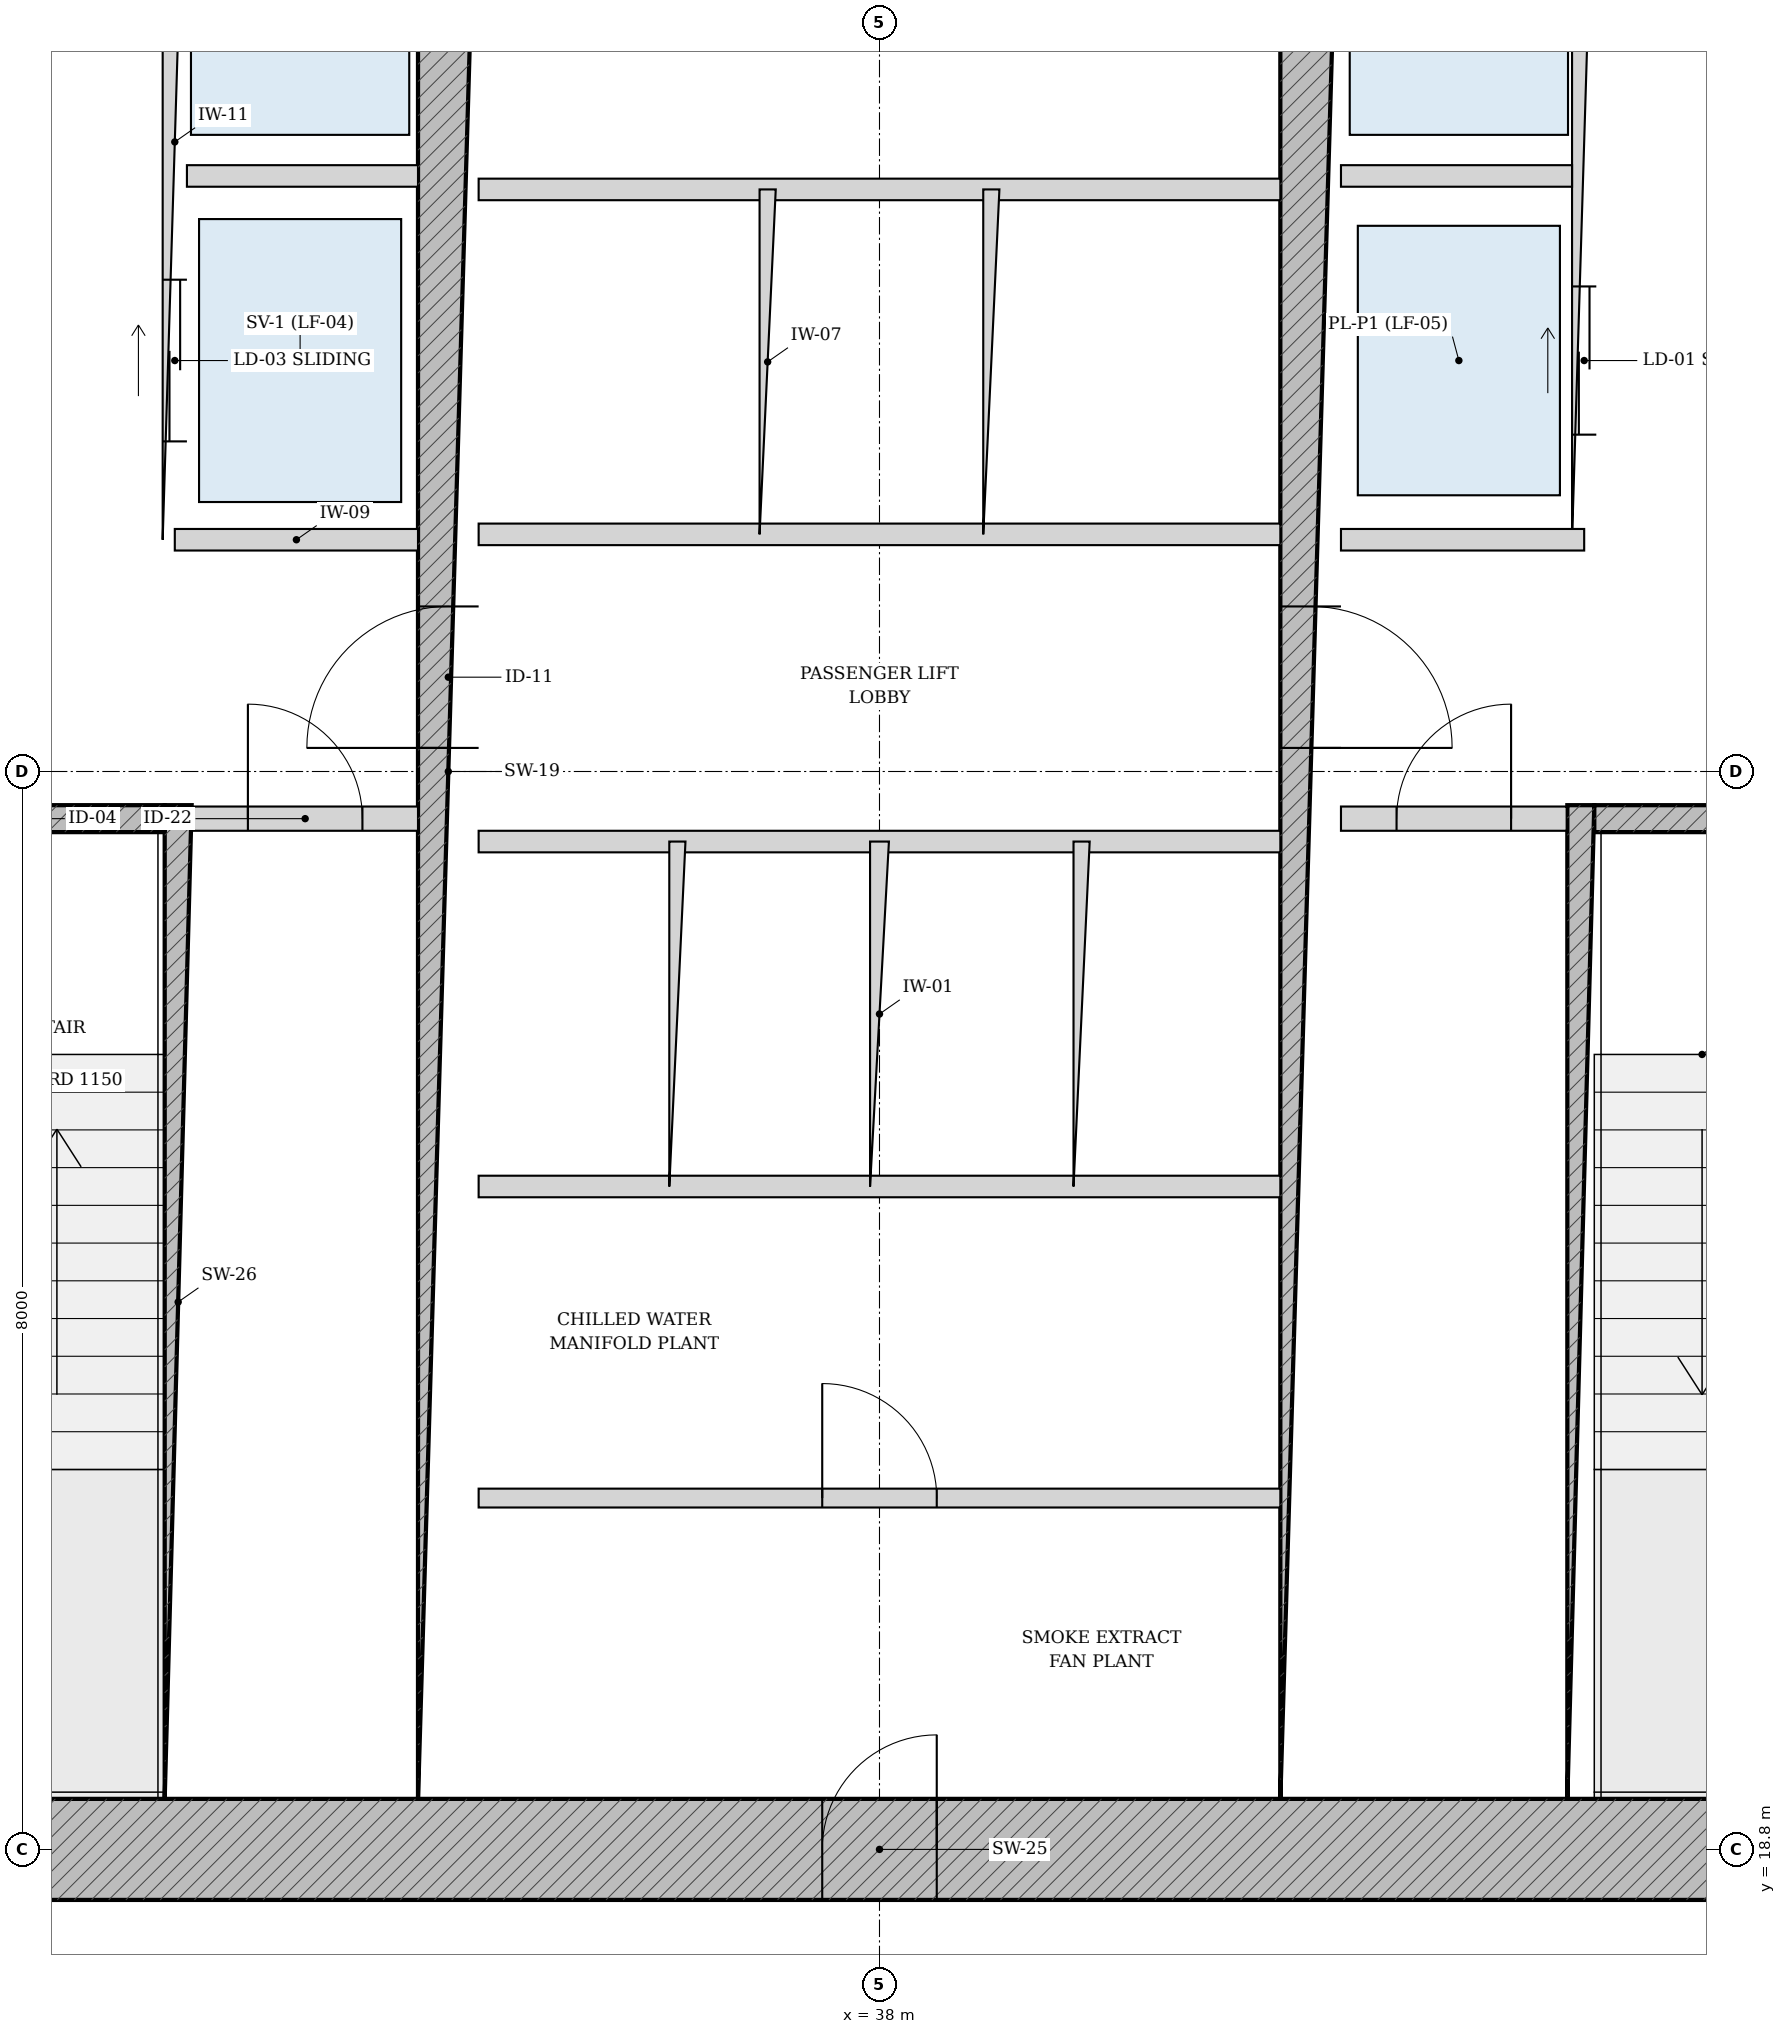
"""IFC4 building model, lengths in metres.
Left out: names, types, materials, properties, quantities, classifications, styles, units other than length and angle.
Written with IfcOpenShell. Run it as: python <this file> out.ifc"""

import sys

from ifc_helpers import new_model, si_unit, direction, frame, frame_2d, origin, place, context, subcontext, project, spatial, rectangle, extrude, source, transform, mapped, element, fill, save


model = new_model("IFC4")
c1 = context("Model", 3, precision=1e-05, world=origin(), true_north=direction((-0.2419218956, 0.970295726276)))
c2 = subcontext(c1, "Body", "Model", "MODEL_VIEW")
j1 = project(units=[si_unit("LENGTHUNIT", "METRE"), si_unit("PLANEANGLEUNIT", "RADIAN")], contexts=[c1])
p1 = place(None, origin())
s1 = spatial("IfcSite", under=j1, at=p1, CompositionType="ELEMENT")
p2 = place(p1, origin())
s2 = spatial("IfcBuilding", under=s1, at=p2, CompositionType="ELEMENT")
p3 = place(p2, frame((0.0, 0.0, -8.4)))
s3 = spatial("IfcBuildingStorey", under=s2, at=p3, CompositionType="ELEMENT", Elevation=-8.4)
p4 = place(p3, frame((28.625, 18.8, 0.0), z_axis=(0.0, 0.0, 1.0), x_axis=(1.0, 0.0, 0.0)))
e1 = element("IfcWall", 1, at=p4, inside=s3, PredefinedType="SHEAR", context=c2, shape_type="SweptSolid", body=[
    extrude(rectangle(XDim=18.75, YDim=0.75, at=frame_2d((9.375, 0.0))), origin(), (0.0, 0.0, 1.0), 3.88),
])
p5 = place(p4, frame((8.95, 0.0, 0.0)))
e2 = element("IfcOpeningElement", 2, at=p5, cuts=e1, PredefinedType="OPENING", context=c2, shape_type="SweptSolid", body=[
    extrude(rectangle(XDim=0.85, YDim=2.1, at=frame_2d((0.425, 1.05))), frame((0.0, 0.385, 0.0), z_axis=(0.0, -1.0, 0.0), x_axis=(1.0, 0.0, 0.0)), (0.0, 0.0, 1.0), 0.77),
])
p6 = place(p3, frame((32.795, 19.175, 0.0), z_axis=(0.0, 0.0, 1.0), x_axis=(0.0, 1.0, 0.0)))
e3 = element("IfcWall", 3, at=p6, inside=s3, PredefinedType="SOLIDWALL", context=c2, shape_type="SweptSolid", body=[
    extrude(rectangle(XDim=7.375, YDim=0.2, at=frame_2d((3.688, 0.0))), origin(), (0.0, 0.0, 1.0), 3.88),
])
p7 = place(p3, frame((29.375, 26.45, 0.0), z_axis=(0.0, 0.0, 1.0), x_axis=(1.0, 0.0, 0.0)))
e4 = element("IfcWall", 4, at=p7, inside=s3, PredefinedType="SOLIDWALL", context=c2, shape_type="SweptSolid", body=[
    extrude(rectangle(XDim=3.32, YDim=0.2, at=frame_2d((1.66, 0.0))), origin(), (0.0, 0.0, 1.0), 3.88),
])
p8 = place(p7, frame((1.185, 0.0, 0.0)))
e5 = element("IfcOpeningElement", 5, at=p8, cuts=e4, PredefinedType="OPENING", context=c2, shape_type="SweptSolid", body=[
    extrude(rectangle(XDim=0.95, YDim=2.15, at=frame_2d((0.475, 1.075))), frame((0.0, 0.11, 0.0), z_axis=(0.0, -1.0, 0.0), x_axis=(1.0, 0.0, 0.0)), (0.0, 0.0, 1.0), 0.22),
])
p9 = place(p3, frame((43.205, 19.175, 0.0), z_axis=(0.0, 0.0, 1.0), x_axis=(0.0, 1.0, 0.0)))
e6 = element("IfcWall", 6, at=p9, inside=s3, PredefinedType="SOLIDWALL", context=c2, shape_type="SweptSolid", body=[
    extrude(rectangle(XDim=7.375, YDim=0.2, at=frame_2d((3.688, 0.0))), origin(), (0.0, 0.0, 1.0), 3.88),
])
p10 = place(p3, frame((43.305, 26.45, 0.0), z_axis=(0.0, 0.0, 1.0), x_axis=(1.0, 0.0, 0.0)))
e7 = element("IfcWall", 7, at=p10, inside=s3, PredefinedType="SOLIDWALL", context=c2, shape_type="SweptSolid", body=[
    extrude(rectangle(XDim=3.32, YDim=0.2, at=frame_2d((1.66, 0.0))), origin(), (0.0, 0.0, 1.0), 3.88),
])
p11 = place(p10, frame((1.185, 0.0, 0.0)))
e8 = element("IfcOpeningElement", 8, at=p11, cuts=e7, PredefinedType="OPENING", context=c2, shape_type="SweptSolid", body=[
    extrude(rectangle(XDim=0.95, YDim=2.15, at=frame_2d((0.475, 1.075))), frame((0.0, 0.11, 0.0), z_axis=(0.0, -1.0, 0.0), x_axis=(1.0, 0.0, 0.0)), (0.0, 0.0, 1.0), 0.22),
])
p12 = place(p3, frame((34.8, 19.175, 0.0), z_axis=(0.0, 0.0, 1.0), x_axis=(0.0, 1.0, 0.0)))
e9 = element("IfcWall", 9, at=p12, inside=s3, PredefinedType="SHEAR", context=c2, shape_type="SweptSolid", body=[
    extrude(rectangle(XDim=15.25, YDim=0.45, at=frame_2d((7.625, 0.0))), origin(), (0.0, 0.0, 1.0), 3.88),
])
p13 = place(p12, frame((7.8, 0.0, 0.0)))
e10 = element("IfcOpeningElement", 10, at=p13, cuts=e9, PredefinedType="OPENING", context=c2, shape_type="SweptSolid", body=[
    extrude(rectangle(XDim=1.05, YDim=2.15, at=frame_2d((0.525, 1.075))), frame((0.0, 0.235, 0.0), z_axis=(0.0, -1.0, 0.0), x_axis=(1.0, 0.0, 0.0)), (0.0, 0.0, 1.0), 0.47),
])
p14 = place(p3, frame((41.2, 19.175, 0.0), z_axis=(0.0, 0.0, 1.0), x_axis=(0.0, 1.0, 0.0)))
e11 = element("IfcWall", 11, at=p14, inside=s3, PredefinedType="SHEAR", context=c2, shape_type="SweptSolid", body=[
    extrude(rectangle(XDim=15.25, YDim=0.45, at=frame_2d((7.625, 0.0))), origin(), (0.0, 0.0, 1.0), 3.88),
])
p15 = place(p14, frame((7.8, 0.0, 0.0)))
e12 = element("IfcOpeningElement", 12, at=p15, cuts=e11, PredefinedType="OPENING", context=c2, shape_type="SweptSolid", body=[
    extrude(rectangle(XDim=1.05, YDim=2.15, at=frame_2d((0.525, 1.075))), frame((0.0, 0.235, 0.0), z_axis=(0.0, -1.0, 0.0), x_axis=(1.0, 0.0, 0.0)), (0.0, 0.0, 1.0), 0.47),
])
p16 = place(p3, frame((32.9, 26.45, 0.0), z_axis=(0.0, 0.0, 1.0), x_axis=(1.0, 0.0, 0.0)))
e13 = element("IfcWall", 13, at=p16, inside=s3, PredefinedType="PARTITIONING", context=c2, shape_type="SweptSolid", body=[
    extrude(rectangle(XDim=1.675, YDim=0.18, at=frame_2d((0.837, 0.0))), origin(), (0.0, 0.0, 1.0), 3.88),
])
p17 = place(p16, frame((0.413, 0.0, 0.0)))
e14 = element("IfcOpeningElement", 14, at=p17, cuts=e13, PredefinedType="OPENING", context=c2, shape_type="SweptSolid", body=[
    extrude(rectangle(XDim=0.85, YDim=2.1, at=frame_2d((0.425, 1.05))), frame((0.0, 0.1, 0.0), z_axis=(0.0, -1.0, 0.0), x_axis=(1.0, 0.0, 0.0)), (0.0, 0.0, 1.0), 0.2),
])
p18 = place(p3, frame((41.425, 26.45, 0.0), z_axis=(0.0, 0.0, 1.0), x_axis=(1.0, 0.0, 0.0)))
e15 = element("IfcWall", 15, at=p18, inside=s3, PredefinedType="PARTITIONING", context=c2, shape_type="SweptSolid", body=[
    extrude(rectangle(XDim=1.675, YDim=0.18, at=frame_2d((0.837, 0.0))), origin(), (0.0, 0.0, 1.0), 3.88),
])
p19 = place(p18, frame((0.413, 0.0, 0.0)))
e16 = element("IfcOpeningElement", 16, at=p19, cuts=e15, PredefinedType="OPENING", context=c2, shape_type="SweptSolid", body=[
    extrude(rectangle(XDim=0.85, YDim=2.1, at=frame_2d((0.425, 1.05))), frame((0.0, 0.1, 0.0), z_axis=(0.0, -1.0, 0.0), x_axis=(1.0, 0.0, 0.0)), (0.0, 0.0, 1.0), 0.2),
])
p20 = place(p3, frame((32.77, 28.52, 0.0), z_axis=(0.0, 0.0, 1.0), x_axis=(0.0, 1.0, 0.0)))
e17 = element("IfcWall", 17, at=p20, inside=s3, PredefinedType="PARTITIONING", context=c2, shape_type="SweptSolid", body=[
    extrude(rectangle(XDim=5.905, YDim=0.18, at=frame_2d((2.953, 0.0))), origin(), (0.0, 0.0, 1.0), 3.88),
])
p21 = place(p20, frame((3.655, 0.0, 0.0)))
e18 = element("IfcOpeningElement", 18, at=p21, cuts=e17, PredefinedType="OPENING", context=c2, shape_type="SweptSolid", body=[
    extrude(rectangle(XDim=1.15, YDim=2.2, at=frame_2d((0.575, 1.1))), frame((0.0, 0.1, 0.0), z_axis=(0.0, -1.0, 0.0), x_axis=(1.0, 0.0, 0.0)), (0.0, 0.0, 1.0), 0.2),
])
p22 = place(p20, frame((0.73, 0.0, 0.0)))
e19 = element("IfcOpeningElement", 19, at=p22, cuts=e17, PredefinedType="OPENING", context=c2, shape_type="SweptSolid", body=[
    extrude(rectangle(XDim=1.2, YDim=2.25, at=frame_2d((0.6, 1.125))), frame((0.0, 0.1, 0.0), z_axis=(0.0, -1.0, 0.0), x_axis=(1.0, 0.0, 0.0)), (0.0, 0.0, 1.0), 0.2),
])
p23 = place(p3, frame((32.86, 31.22, 0.0), z_axis=(0.0, 0.0, 1.0), x_axis=(1.0, 0.0, 0.0)))
e20 = element("IfcWall", 20, at=p23, inside=s3, PredefinedType="PARTITIONING", context=c2, shape_type="SweptSolid", body=[
    extrude(rectangle(XDim=1.715, YDim=0.16, at=frame_2d((0.857, 0.0))), origin(), (0.0, 0.0, 1.0), 3.88),
])
p24 = place(p3, frame((32.77, 28.52, 0.0), z_axis=(0.0, 0.0, 1.0), x_axis=(1.0, 0.0, 0.0)))
e21 = element("IfcWall", 21, at=p24, inside=s3, PredefinedType="PARTITIONING", context=c2, shape_type="SweptSolid", body=[
    extrude(rectangle(XDim=1.805, YDim=0.16, at=frame_2d((0.902, 0.0))), origin(), (0.0, 0.0, 1.0), 3.88),
])
p25 = place(p3, frame((43.23, 28.52, 0.0), z_axis=(0.0, 0.0, 1.0), x_axis=(0.0, 1.0, 0.0)))
e22 = element("IfcWall", 22, at=p25, inside=s3, PredefinedType="PARTITIONING", context=c2, shape_type="SweptSolid", body=[
    extrude(rectangle(XDim=5.905, YDim=0.18, at=frame_2d((2.953, 0.0))), origin(), (0.0, 0.0, 1.0), 3.88),
])
p26 = place(p25, frame((3.655, 0.0, 0.0)))
e23 = element("IfcOpeningElement", 23, at=p26, cuts=e22, PredefinedType="OPENING", context=c2, shape_type="SweptSolid", body=[
    extrude(rectangle(XDim=1.15, YDim=2.2, at=frame_2d((0.575, 1.1))), frame((0.0, 0.1, 0.0), z_axis=(0.0, -1.0, 0.0), x_axis=(1.0, 0.0, 0.0)), (0.0, 0.0, 1.0), 0.2),
])
p27 = place(p25, frame((0.78, 0.0, 0.0)))
e24 = element("IfcOpeningElement", 24, at=p27, cuts=e22, PredefinedType="OPENING", context=c2, shape_type="SweptSolid", body=[
    extrude(rectangle(XDim=1.1, YDim=2.2, at=frame_2d((0.55, 1.1))), frame((0.0, 0.1, 0.0), z_axis=(0.0, -1.0, 0.0), x_axis=(1.0, 0.0, 0.0)), (0.0, 0.0, 1.0), 0.2),
])
p28 = place(p3, frame((41.425, 31.22, 0.0), z_axis=(0.0, 0.0, 1.0), x_axis=(1.0, 0.0, 0.0)))
e25 = element("IfcWall", 25, at=p28, inside=s3, PredefinedType="PARTITIONING", context=c2, shape_type="SweptSolid", body=[
    extrude(rectangle(XDim=1.715, YDim=0.16, at=frame_2d((0.857, 0.0))), origin(), (0.0, 0.0, 1.0), 3.88),
])
p29 = place(p3, frame((41.425, 28.52, 0.0), z_axis=(0.0, 0.0, 1.0), x_axis=(1.0, 0.0, 0.0)))
e26 = element("IfcWall", 26, at=p29, inside=s3, PredefinedType="PARTITIONING", context=c2, shape_type="SweptSolid", body=[
    extrude(rectangle(XDim=1.805, YDim=0.16, at=frame_2d((0.902, 0.0))), origin(), (0.0, 0.0, 1.0), 3.88),
])
for number, where, z_axis, x_axis in (
    (27, (35.025, 28.56, 0.0), (0.0, 0.0, 1.0), (1.0, 0.0, 0.0)),
    (28, (35.025, 31.12, 0.0), (0.0, 0.0, 1.0), (1.0, 0.0, 0.0)),
):
    element("IfcWall", number, at=place(p3, frame(where, z_axis=z_axis, x_axis=x_axis)), inside=s3, PredefinedType="PARTITIONING", context=c2, shape_type="SweptSolid", body=[
        extrude(rectangle(XDim=5.95, YDim=0.16, at=frame_2d((2.975, 0.0))), origin(), (0.0, 0.0, 1.0), 3.88),
    ])
for number, where, z_axis, x_axis in (
    (29, (37.17, 28.56, 0.0), (0.0, 0.0, 1.0), (0.0, 1.0, 0.0)),
    (30, (38.83, 28.56, 0.0), (0.0, 0.0, 1.0), (0.0, 1.0, 0.0)),
):
    element("IfcWall", number, at=place(p3, frame(where, z_axis=z_axis, x_axis=x_axis)), inside=s3, PredefinedType="PARTITIONING", context=c2, shape_type="SweptSolid", body=[
        extrude(rectangle(XDim=2.56, YDim=0.12, at=frame_2d((1.28, 0.0))), origin(), (0.0, 0.0, 1.0), 3.88),
    ])
for number, where, z_axis, x_axis in (
    (31, (35.025, 26.28, 0.0), (0.0, 0.0, 1.0), (1.0, 0.0, 0.0)),
    (32, (35.025, 23.72, 0.0), (0.0, 0.0, 1.0), (1.0, 0.0, 0.0)),
):
    element("IfcWall", number, at=place(p3, frame(where, z_axis=z_axis, x_axis=x_axis)), inside=s3, PredefinedType="PARTITIONING", context=c2, shape_type="SweptSolid", body=[
        extrude(rectangle(XDim=5.95, YDim=0.16, at=frame_2d((2.975, 0.0))), origin(), (0.0, 0.0, 1.0), 3.88),
    ])
p30 = place(p3, frame((36.5, 23.72, 0.0), z_axis=(0.0, 0.0, 1.0), x_axis=(0.0, 1.0, 0.0)))
e33 = element("IfcWall", 33, at=p30, inside=s3, PredefinedType="PARTITIONING", context=c2, shape_type="SweptSolid", body=[
    extrude(rectangle(XDim=2.56, YDim=0.12, at=frame_2d((1.28, 0.0))), origin(), (0.0, 0.0, 1.0), 3.88),
])
p31 = place(p3, frame((38.0, 23.72, 0.0), z_axis=(0.0, 0.0, 1.0), x_axis=(0.0, 1.0, 0.0)))
e34 = element("IfcWall", 34, at=p31, inside=s3, PredefinedType="PARTITIONING", context=c2, shape_type="SweptSolid", body=[
    extrude(rectangle(XDim=2.56, YDim=0.14, at=frame_2d((1.28, 0.0))), origin(), (0.0, 0.0, 1.0), 3.88),
])
p32 = place(p3, frame((39.5, 23.72, 0.0), z_axis=(0.0, 0.0, 1.0), x_axis=(0.0, 1.0, 0.0)))
e35 = element("IfcWall", 35, at=p32, inside=s3, PredefinedType="PARTITIONING", context=c2, shape_type="SweptSolid", body=[
    extrude(rectangle(XDim=2.56, YDim=0.12, at=frame_2d((1.28, 0.0))), origin(), (0.0, 0.0, 1.0), 3.88),
])
p33 = place(p3, frame((35.025, 21.407, 0.0), z_axis=(0.0, 0.0, 1.0), x_axis=(1.0, 0.0, 0.0)))
e36 = element("IfcWall", 36, at=p33, inside=s3, PredefinedType="PARTITIONING", context=c2, shape_type="SweptSolid", body=[
    extrude(rectangle(XDim=5.95, YDim=0.14, at=frame_2d((2.975, 0.0))), origin(), (0.0, 0.0, 1.0), 3.88),
])
p34 = place(p33, frame((2.55, 0.0, 0.0)))
e37 = element("IfcOpeningElement", 37, at=p34, cuts=e36, PredefinedType="OPENING", context=c2, shape_type="SweptSolid", body=[
    extrude(rectangle(XDim=0.85, YDim=2.1, at=frame_2d((0.425, 1.05))), frame((0.0, 0.08, 0.0), z_axis=(0.0, -1.0, 0.0), x_axis=(1.0, 0.0, 0.0)), (0.0, 0.0, 1.0), 0.16),
])
m1 = source(origin(), c2, "Body", "SweptSolid", [
    extrude(rectangle(XDim=1.05, YDim=2.15, at=frame_2d((0.525, 1.075))), frame((0.0, 0.025, 0.0), z_axis=(0.0, -1.0, 0.0), x_axis=(1.0, 0.0, 0.0)), (0.0, 0.0, 1.0), 0.05),
])
p35 = place(p13, origin())
e38 = element("IfcDoor", 38, at=p35, inside=s3, OperationType="SINGLE_SWING_LEFT", PredefinedType="DOOR", context=c2, shape_type="MappedRepresentation", body=[
    mapped(m1, transform((0.0, 0.0, 0.0), scale=1.0)),
])
fill(e10, e38)
p36 = place(p15, frame((1.05, 0.0, 0.0), z_axis=(0.0, 0.0, 1.0), x_axis=(-1.0, 0.0, 0.0)))
e39 = element("IfcDoor", 39, at=p36, inside=s3, OperationType="SINGLE_SWING_RIGHT", PredefinedType="DOOR", context=c2, shape_type="MappedRepresentation", body=[
    mapped(m1, transform((0.0, 0.0, 0.0), scale=1.0)),
])
fill(e12, e39)
m2 = source(origin(), c2, "Body", "SweptSolid", [
    extrude(rectangle(XDim=0.85, YDim=2.1, at=frame_2d((0.425, 1.05))), frame((0.0, 0.025, 0.0), z_axis=(0.0, -1.0, 0.0), x_axis=(1.0, 0.0, 0.0)), (0.0, 0.0, 1.0), 0.05),
])
p37 = place(p17, origin())
e40 = element("IfcDoor", 40, at=p37, inside=s3, OperationType="SINGLE_SWING_LEFT", PredefinedType="DOOR", context=c2, shape_type="MappedRepresentation", body=[
    mapped(m2, transform((0.0, 0.0, 0.0), scale=1.0)),
])
fill(e14, e40)
p38 = place(p19, origin())
e41 = element("IfcDoor", 41, at=p38, inside=s3, OperationType="SINGLE_SWING_RIGHT", PredefinedType="DOOR", context=c2, shape_type="MappedRepresentation", body=[
    mapped(m2, transform((0.0, 0.0, 0.0), scale=1.0)),
])
fill(e16, e41)
p39 = place(p5, origin())
e42 = element("IfcDoor", 42, at=p39, inside=s3, OperationType="SINGLE_SWING_RIGHT", PredefinedType="DOOR", context=c2, shape_type="MappedRepresentation", body=[
    mapped(m2, transform((0.0, 0.0, 0.0), scale=1.0)),
])
fill(e2, e42)
p40 = place(p34, origin())
e43 = element("IfcDoor", 43, at=p40, inside=s3, OperationType="SINGLE_SWING_LEFT", PredefinedType="DOOR", context=c2, shape_type="MappedRepresentation", body=[
    mapped(m2, transform((0.0, 0.0, 0.0), scale=1.0)),
])
fill(e37, e43)
m3 = source(origin(), c2, "Body", "SweptSolid", [
    extrude(rectangle(XDim=1.2, YDim=2.25, at=frame_2d((0.6, 1.125))), frame((0.0, 0.025, 0.0), z_axis=(0.0, -1.0, 0.0), x_axis=(1.0, 0.0, 0.0)), (0.0, 0.0, 1.0), 0.05),
])
p41 = place(p22, origin())
e44 = element("IfcDoor", 44, at=p41, inside=s3, OperationType="DOUBLE_DOOR_SLIDING", PredefinedType="DOOR", context=c2, shape_type="MappedRepresentation", body=[
    mapped(m3, transform((0.0, 0.0, 0.0), scale=1.0)),
])
fill(e19, e44)
m4 = source(origin(), c2, "Body", "SweptSolid", [
    extrude(rectangle(XDim=1.1, YDim=2.2, at=frame_2d((0.55, 1.1))), frame((0.0, 0.025, 0.0), z_axis=(0.0, -1.0, 0.0), x_axis=(1.0, 0.0, 0.0)), (0.0, 0.0, 1.0), 0.05),
])
p42 = place(p27, origin())
e45 = element("IfcDoor", 45, at=p42, inside=s3, OperationType="DOUBLE_DOOR_SLIDING", PredefinedType="DOOR", context=c2, shape_type="MappedRepresentation", body=[
    mapped(m4, transform((0.0, 0.0, 0.0), scale=1.0)),
])
fill(e24, e45)
save(model, sys.argv[1])
